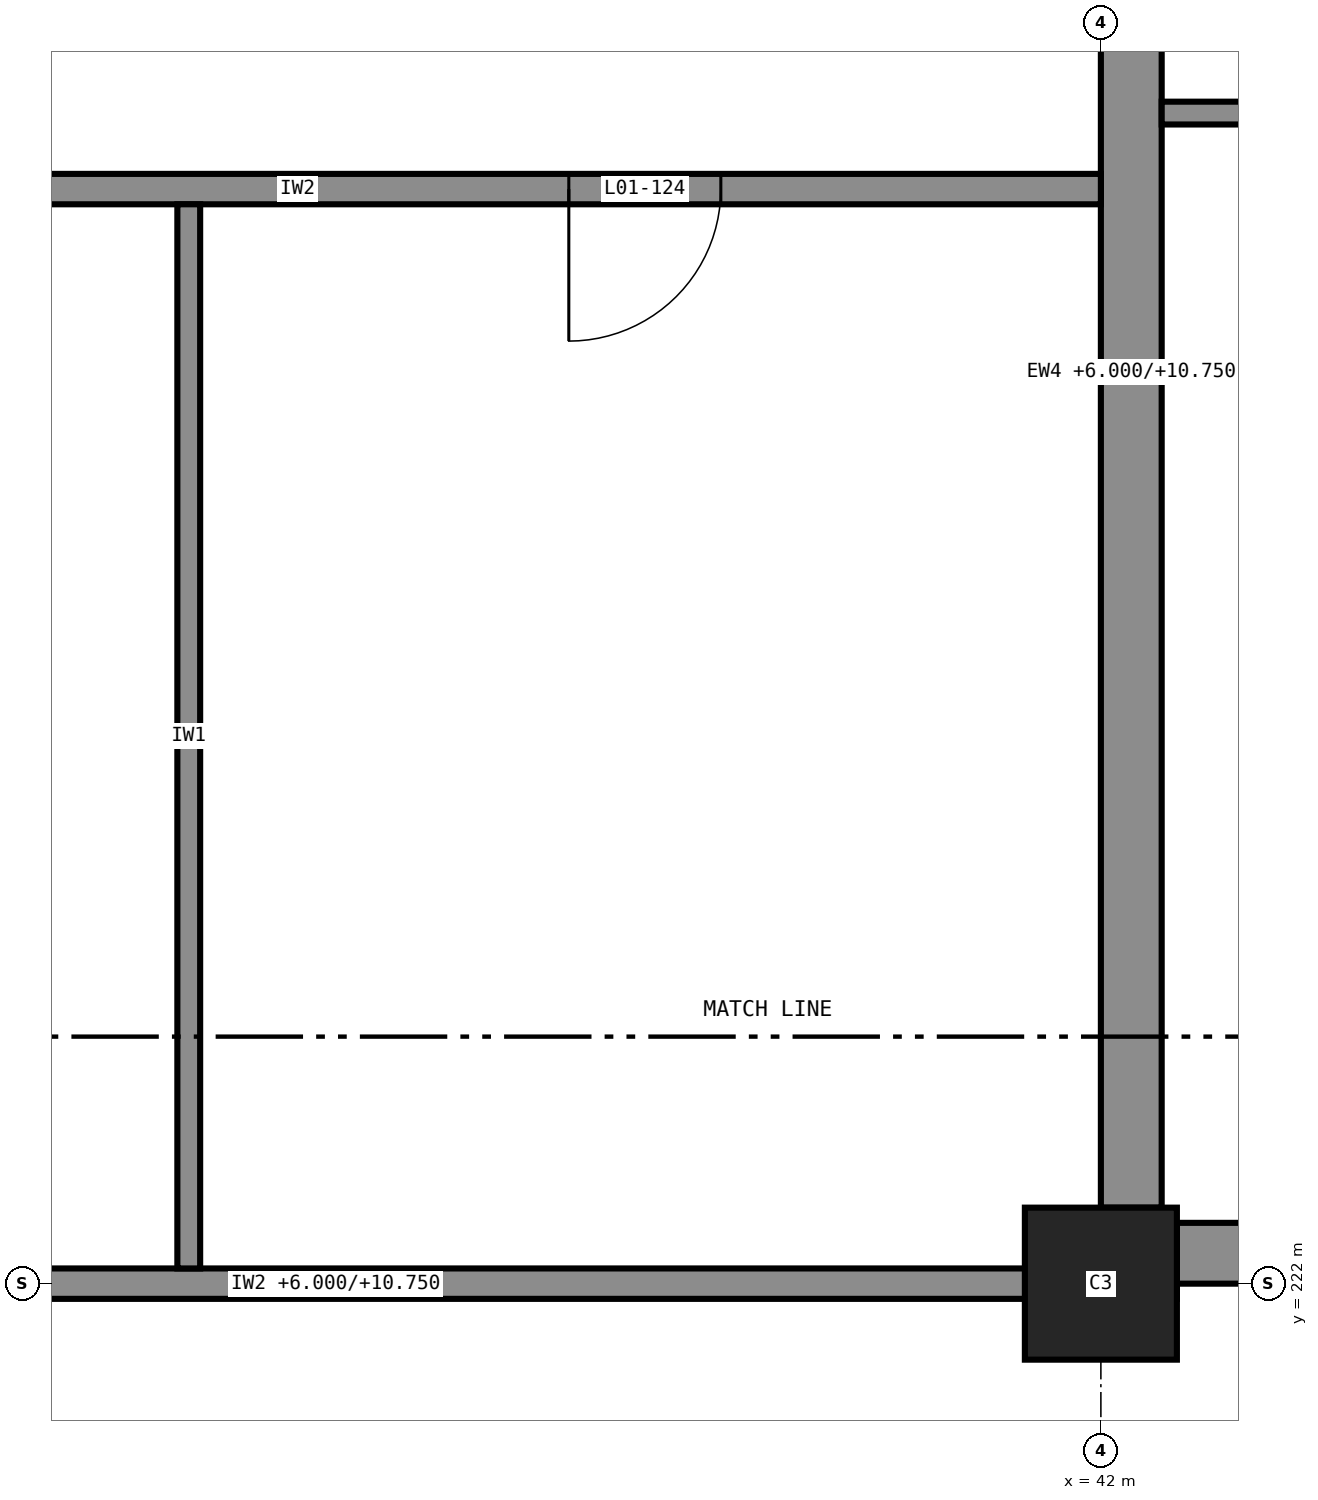
"""IFC4 building model, lengths in metres.
Left out: names, types, materials, properties, quantities, classifications, styles, units other than length and angle.
Written with IfcOpenShell. Run it as: python <this file> out.ifc"""

import sys

from ifc_helpers import new_model, si_unit, direction, frame, frame_2d, origin, origin_2d, place, context, subcontext, project, spatial, rectangle, extrude, element, fill, save


model = new_model("IFC4")
c1 = context("Model", 3, precision=1e-05, world=origin(), true_north=direction((0.0, 1.0)))
c2 = subcontext(c1, "Body", "Model", "MODEL_VIEW")
j1 = project(units=[si_unit("LENGTHUNIT", "METRE"), si_unit("PLANEANGLEUNIT", "RADIAN")], contexts=[c1])
p1 = place(None, origin())
s1 = spatial("IfcSite", under=j1, at=p1, CompositionType="ELEMENT")
p2 = place(p1, origin())
s2 = spatial("IfcBuilding", under=s1, at=p2, CompositionType="ELEMENT")
p3 = place(p2, frame((0.0, 0.0, 6.0)))
s3 = spatial("IfcBuildingStorey", under=s2, at=p3, CompositionType="ELEMENT", Elevation=6.0)
p4 = place(p3, frame((42.0, 222.0, 0.0), z_axis=(0.0, 0.0, 1.0), x_axis=(1.0, 0.0, 0.0)))
e1 = element("IfcColumn", 1, at=p4, inside=s3, PredefinedType="COLUMN", context=c2, shape_type="SweptSolid", body=[
    extrude(rectangle(XDim=1.0, YDim=1.0, at=origin_2d()), origin(), (0.0, 0.0, 1.0), 6.0),
])
for number, where, z_axis, x_axis in (
    (2, (42.5, 222.2, 0.0), (0.0, 0.0, 1.0), (1.0, 0.0, 0.0)),
    (3, (42.2, 233.5, 0.0), (0.0, 0.0, 1.0), (0.0, -1.0, 0.0)),
):
    element("IfcWall", number, at=place(p3, frame(where, z_axis=z_axis, x_axis=x_axis)), inside=s3, PredefinedType="SOLIDWALL", context=c2, shape_type="SweptSolid", body=[
        extrude(rectangle(XDim=11.0, YDim=0.4, at=frame_2d((5.5, 0.0))), origin(), (0.0, 0.0, 1.0), 4.75),
    ])
p5 = place(p3, frame((30.075, 222.0, 0.0), z_axis=(0.0, 0.0, 1.0), x_axis=(1.0, 0.0, 0.0)))
e4 = element("IfcWall", 4, at=p5, inside=s3, PredefinedType="PARTITIONING", context=c2, shape_type="SweptSolid", body=[
    extrude(rectangle(XDim=12.425, YDim=0.2, at=frame_2d((6.212, 0.0))), origin(), (0.0, 0.0, 1.0), 4.75),
])
p6 = place(p3, frame((23.9, 229.2, 0.0), z_axis=(0.0, 0.0, 1.0), x_axis=(1.0, 0.0, 0.0)))
e5 = element("IfcWall", 5, at=p6, inside=s3, PredefinedType="PARTITIONING", context=c2, shape_type="SweptSolid", body=[
    extrude(rectangle(XDim=18.1, YDim=0.2, at=frame_2d((9.05, 0.0))), origin(), (0.0, 0.0, 1.0), 5.75),
])
p7 = place(p6, frame((8.6, 0.0, 0.0)))
e6 = element("IfcOpeningElement", 6, at=p7, cuts=e5, PredefinedType="OPENING", context=c2, shape_type="SweptSolid", body=[
    extrude(rectangle(XDim=1.0, YDim=2.1, at=frame_2d((0.5, 1.05))), frame((0.0, 0.11, 0.0), z_axis=(0.0, -1.0, 0.0), x_axis=(1.0, 0.0, 0.0)), (0.0, 0.0, 1.0), 0.22),
])
p8 = place(p6, frame((14.6, 0.0, 0.0)))
e7 = element("IfcOpeningElement", 7, at=p8, cuts=e5, PredefinedType="OPENING", context=c2, shape_type="SweptSolid", body=[
    extrude(rectangle(XDim=1.0, YDim=2.1, at=frame_2d((0.5, 1.05))), frame((0.0, 0.11, 0.0), z_axis=(0.0, -1.0, 0.0), x_axis=(1.0, 0.0, 0.0)), (0.0, 0.0, 1.0), 0.22),
])
p9 = place(p3, frame((36.0, 222.1, 0.0), z_axis=(0.0, 0.0, 1.0), x_axis=(0.0, 1.0, 0.0)))
e8 = element("IfcWall", 8, at=p9, inside=s3, PredefinedType="PARTITIONING", context=c2, shape_type="SweptSolid", body=[
    extrude(rectangle(XDim=7.0, YDim=0.15, at=frame_2d((3.5, 0.0))), origin(), (0.0, 0.0, 1.0), 5.75),
])
p10 = place(p3, frame((66.1, 229.7, 0.0), z_axis=(0.0, 0.0, 1.0), x_axis=(-1.0, 0.0, 0.0)))
e9 = element("IfcWall", 9, at=p10, inside=s3, PredefinedType="PARTITIONING", context=c2, shape_type="SweptSolid", body=[
    extrude(rectangle(XDim=23.7, YDim=0.15, at=frame_2d((11.85, 0.0))), origin(), (0.0, 0.0, 1.0), 5.75),
])
p11 = place(p10, frame((15.6, 0.0, 0.0)))
e10 = element("IfcOpeningElement", 10, at=p11, cuts=e9, PredefinedType="OPENING", context=c2, shape_type="SweptSolid", body=[
    extrude(rectangle(XDim=1.0, YDim=2.1, at=frame_2d((0.5, 1.05))), frame((0.0, 0.085, 0.0), z_axis=(0.0, -1.0, 0.0), x_axis=(1.0, 0.0, 0.0)), (0.0, 0.0, 1.0), 0.17),
])
p12 = place(p10, frame((6.6, 0.0, 0.0)))
e11 = element("IfcOpeningElement", 11, at=p12, cuts=e9, PredefinedType="OPENING", context=c2, shape_type="SweptSolid", body=[
    extrude(rectangle(XDim=1.0, YDim=2.1, at=frame_2d((0.5, 1.05))), frame((0.0, 0.085, 0.0), z_axis=(0.0, -1.0, 0.0), x_axis=(1.0, 0.0, 0.0)), (0.0, 0.0, 1.0), 0.17),
])
p13 = place(p8, frame((1.0, 0.0, 0.0), z_axis=(0.0, 0.0, 1.0), x_axis=(-1.0, 0.0, 0.0)))
e12 = element("IfcDoor", 12, at=p13, inside=s3, OperationType="SINGLE_SWING_LEFT", PredefinedType="DOOR", context=c2, shape_type="SweptSolid", body=[
    extrude(rectangle(XDim=1.0, YDim=2.1, at=frame_2d((0.5, 1.05))), frame((0.0, 0.025, 0.0), z_axis=(0.0, -1.0, 0.0), x_axis=(1.0, 0.0, 0.0)), (0.0, 0.0, 1.0), 0.05),
])
fill(e7, e12)
save(model, sys.argv[1])
